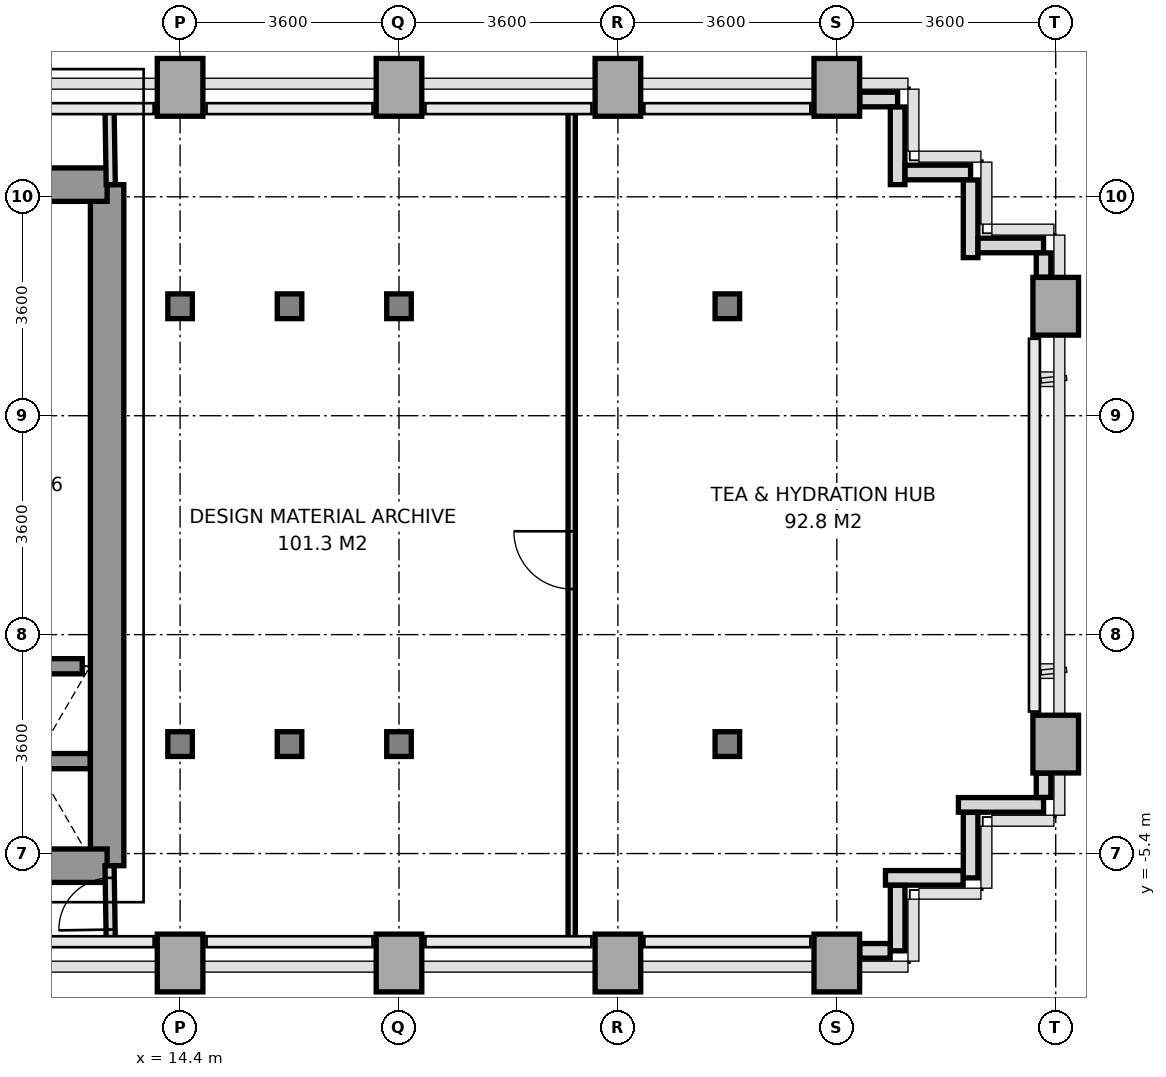
"""IFC4 building model, lengths in metres.
Left out: names, types, materials, properties, quantities, classifications, styles, units other than length and angle.
Written with IfcOpenShell. Run it as: python <this file> out.ifc"""

import sys

from ifc_helpers import new_model, si_unit, direction, frame, frame_2d, origin, origin_2d, place, context, subcontext, project, spatial, rectangle, i_section, extrude, source, transform, mapped, element, fill, save


model = new_model("IFC4")
c1 = context("Model", 3, precision=1e-05, world=origin(), true_north=direction((0.0, 1.0)))
c2 = subcontext(c1, "Body", "Model", "MODEL_VIEW")
j1 = project(units=[si_unit("LENGTHUNIT", "METRE"), si_unit("PLANEANGLEUNIT", "RADIAN")], contexts=[c1])
p1 = place(None, origin())
s1 = spatial("IfcSite", under=j1, at=p1, CompositionType="ELEMENT")
p2 = place(p1, origin())
s2 = spatial("IfcBuilding", under=s1, at=p2, CompositionType="ELEMENT")
p3 = place(p2, frame((0.0, 0.0, 57.8)))
s3 = spatial("IfcBuildingStorey", under=s2, at=p3, CompositionType="ELEMENT", Elevation=57.8)
m1 = source(origin(), c2, "Body", "SweptSolid", [
    extrude(rectangle(XDim=0.75, YDim=0.95, at=origin_2d()), origin(), (0.0, 0.0, 1.0), 3.2),
])
p4 = place(p3, frame((14.4, -7.2, 0.0), z_axis=(0.0, 0.0, 1.0), x_axis=(1.0, 0.0, 0.0)))
e1 = element("IfcColumn", 1, at=p4, inside=s3, PredefinedType="COLUMN", context=c2, shape_type="MappedRepresentation", body=[
    mapped(m1, transform((0.0, 0.0, 0.0), x_axis=(1.0, 0.0, 0.0), y_axis=(0.0, 1.0, 0.0), z_axis=(0.0, 0.0, 1.0), scale=1.0)),
])
m2 = source(origin(), c2, "Body", "SweptSolid", [
    extrude(i_section(OverallWidth=0.404, OverallDepth=0.407, WebThickness=0.022, FlangeThickness=0.035, at=origin_2d()), origin(), (0.0, 0.0, 1.0), 3.2),
])
for number, where, z_axis, x_axis in (
    (2, (14.4, -3.6, 0.0), (0.0, 0.0, 1.0), (1.0, 0.0, 0.0)),
    (3, (14.4, 3.6, 0.0), (0.0, 0.0, 1.0), (1.0, 0.0, 0.0)),
):
    element("IfcColumn", number, at=place(p3, frame(where, z_axis=z_axis, x_axis=x_axis)), inside=s3, PredefinedType="COLUMN", context=c2, shape_type="MappedRepresentation", body=[
        mapped(m2, transform((0.0, 0.0, 0.0), x_axis=(1.0, 0.0, 0.0), y_axis=(0.0, 1.0, 0.0), z_axis=(0.0, 0.0, 1.0), scale=1.0)),
    ])
p5 = place(p3, frame((14.4, 7.2, 0.0), z_axis=(0.0, 0.0, 1.0), x_axis=(1.0, 0.0, 0.0)))
e4 = element("IfcColumn", 4, at=p5, inside=s3, PredefinedType="COLUMN", context=c2, shape_type="MappedRepresentation", body=[
    mapped(m1, transform((0.0, 0.0, 0.0), x_axis=(1.0, 0.0, 0.0), y_axis=(0.0, 1.0, 0.0), z_axis=(0.0, 0.0, 1.0), scale=1.0)),
])
for number, where, z_axis, x_axis in (
    (5, (16.2, -3.6, 0.0), (0.0, 0.0, 1.0), (1.0, 0.0, 0.0)),
    (6, (16.2, 3.6, 0.0), (0.0, 0.0, 1.0), (1.0, 0.0, 0.0)),
):
    element("IfcColumn", number, at=place(p3, frame(where, z_axis=z_axis, x_axis=x_axis)), inside=s3, PredefinedType="COLUMN", context=c2, shape_type="MappedRepresentation", body=[
        mapped(m2, transform((0.0, 0.0, 0.0), x_axis=(1.0, 0.0, 0.0), y_axis=(0.0, 1.0, 0.0), z_axis=(0.0, 0.0, 1.0), scale=1.0)),
    ])
p6 = place(p3, frame((18.0, -7.2, 0.0), z_axis=(0.0, 0.0, 1.0), x_axis=(1.0, 0.0, 0.0)))
e7 = element("IfcColumn", 7, at=p6, inside=s3, PredefinedType="COLUMN", context=c2, shape_type="MappedRepresentation", body=[
    mapped(m1, transform((0.0, 0.0, 0.0), x_axis=(1.0, 0.0, 0.0), y_axis=(0.0, 1.0, 0.0), z_axis=(0.0, 0.0, 1.0), scale=1.0)),
])
for number, where, z_axis, x_axis in (
    (8, (18.0, -3.6, 0.0), (0.0, 0.0, 1.0), (1.0, 0.0, 0.0)),
    (9, (18.0, 3.6, 0.0), (0.0, 0.0, 1.0), (1.0, 0.0, 0.0)),
):
    element("IfcColumn", number, at=place(p3, frame(where, z_axis=z_axis, x_axis=x_axis)), inside=s3, PredefinedType="COLUMN", context=c2, shape_type="MappedRepresentation", body=[
        mapped(m2, transform((0.0, 0.0, 0.0), x_axis=(1.0, 0.0, 0.0), y_axis=(0.0, 1.0, 0.0), z_axis=(0.0, 0.0, 1.0), scale=1.0)),
    ])
for number, where, z_axis, x_axis in (
    (10, (18.0, 7.2, 0.0), (0.0, 0.0, 1.0), (1.0, 0.0, 0.0)),
    (11, (21.6, -7.2, 0.0), (0.0, 0.0, 1.0), (1.0, 0.0, 0.0)),
    (12, (21.6, 7.2, 0.0), (0.0, 0.0, 1.0), (1.0, 0.0, 0.0)),
):
    element("IfcColumn", number, at=place(p3, frame(where, z_axis=z_axis, x_axis=x_axis)), inside=s3, PredefinedType="COLUMN", context=c2, shape_type="MappedRepresentation", body=[
        mapped(m1, transform((0.0, 0.0, 0.0), x_axis=(1.0, 0.0, 0.0), y_axis=(0.0, 1.0, 0.0), z_axis=(0.0, 0.0, 1.0), scale=1.0)),
    ])
for number, where, z_axis, x_axis in (
    (13, (23.4, -3.6, 0.0), (0.0, 0.0, 1.0), (1.0, 0.0, 0.0)),
    (14, (23.4, 3.6, 0.0), (0.0, 0.0, 1.0), (1.0, 0.0, 0.0)),
):
    element("IfcColumn", number, at=place(p3, frame(where, z_axis=z_axis, x_axis=x_axis)), inside=s3, PredefinedType="COLUMN", context=c2, shape_type="MappedRepresentation", body=[
        mapped(m2, transform((0.0, 0.0, 0.0), x_axis=(1.0, 0.0, 0.0), y_axis=(0.0, 1.0, 0.0), z_axis=(0.0, 0.0, 1.0), scale=1.0)),
    ])
for number, where, z_axis, x_axis in (
    (15, (25.2, -7.2, 0.0), (0.0, 0.0, 1.0), (1.0, 0.0, 0.0)),
    (16, (25.2, 7.2, 0.0), (0.0, 0.0, 1.0), (1.0, 0.0, 0.0)),
    (17, (28.8, -3.6, 0.0), (0.0, 0.0, 1.0), (1.0, 0.0, 0.0)),
    (18, (28.8, 3.6, 0.0), (0.0, 0.0, 1.0), (1.0, 0.0, 0.0)),
):
    element("IfcColumn", number, at=place(p3, frame(where, z_axis=z_axis, x_axis=x_axis)), inside=s3, PredefinedType="COLUMN", context=c2, shape_type="MappedRepresentation", body=[
        mapped(m1, transform((0.0, 0.0, 0.0), x_axis=(1.0, 0.0, 0.0), y_axis=(0.0, 1.0, 0.0), z_axis=(0.0, 0.0, 1.0), scale=1.0)),
    ])
p7 = place(p3, frame((28.6, -4.6, 0.0), z_axis=(0.0, 0.0, 1.0), x_axis=(-1.0, 0.0, 0.0)))
e19 = element("IfcWall", 19, at=p7, inside=s3, PredefinedType="PARAPET", context=c2, shape_type="SweptSolid", body=[
    extrude(rectangle(XDim=1.4, YDim=0.24, at=frame_2d((0.7, 0.0))), origin(), (0.0, 0.0, 1.0), 1.15),
])
p8 = place(p3, frame((27.4, -4.723, 0.0), z_axis=(0.0, 0.0, 1.0), x_axis=(0.0, -1.0, 0.0)))
e20 = element("IfcWall", 20, at=p8, inside=s3, PredefinedType="PARAPET", context=c2, shape_type="SweptSolid", body=[
    extrude(rectangle(XDim=1.077, YDim=0.24, at=frame_2d((0.539, 0.0))), origin(), (0.0, 0.0, 1.0), 1.15),
])
p9 = place(p3, frame((27.277, -5.8, 0.0), z_axis=(0.0, 0.0, 1.0), x_axis=(-1.0, 0.0, 0.0)))
e21 = element("IfcWall", 21, at=p9, inside=s3, PredefinedType="PARAPET", context=c2, shape_type="SweptSolid", body=[
    extrude(rectangle(XDim=1.277, YDim=0.24, at=frame_2d((0.639, 0.0))), origin(), (0.0, 0.0, 1.0), 1.15),
])
p10 = place(p3, frame((26.2, -5.923, 0.0), z_axis=(0.0, 0.0, 1.0), x_axis=(0.0, -1.0, 0.0)))
e22 = element("IfcWall", 22, at=p10, inside=s3, PredefinedType="PARAPET", context=c2, shape_type="SweptSolid", body=[
    extrude(rectangle(XDim=1.077, YDim=0.24, at=frame_2d((0.539, 0.0))), origin(), (0.0, 0.0, 1.0), 1.15),
])
p11 = place(p3, frame((26.077, -7.0, 0.0), z_axis=(0.0, 0.0, 1.0), x_axis=(-1.0, 0.0, 0.0)))
e23 = element("IfcWall", 23, at=p11, inside=s3, PredefinedType="PARAPET", context=c2, shape_type="SweptSolid", body=[
    extrude(rectangle(XDim=0.499, YDim=0.24, at=frame_2d((0.25, 0.0))), origin(), (0.0, 0.0, 1.0), 1.15),
])
p12 = place(p3, frame((25.578, 7.0, 0.0), z_axis=(0.0, 0.0, 1.0), x_axis=(1.0, 0.0, 0.0)))
e24 = element("IfcWall", 24, at=p12, inside=s3, PredefinedType="PARAPET", context=c2, shape_type="SweptSolid", body=[
    extrude(rectangle(XDim=0.622, YDim=0.24, at=frame_2d((0.311, 0.0))), origin(), (0.0, 0.0, 1.0), 1.15),
])
p13 = place(p3, frame((26.2, 6.877, 0.0), z_axis=(0.0, 0.0, 1.0), x_axis=(0.0, -1.0, 0.0)))
e25 = element("IfcWall", 25, at=p13, inside=s3, PredefinedType="PARAPET", context=c2, shape_type="SweptSolid", body=[
    extrude(rectangle(XDim=1.277, YDim=0.24, at=frame_2d((0.638, 0.0))), origin(), (0.0, 0.0, 1.0), 1.15),
])
p14 = place(p3, frame((26.323, 5.8, 0.0), z_axis=(0.0, 0.0, 1.0), x_axis=(1.0, 0.0, 0.0)))
e26 = element("IfcWall", 26, at=p14, inside=s3, PredefinedType="PARAPET", context=c2, shape_type="SweptSolid", body=[
    extrude(rectangle(XDim=1.077, YDim=0.24, at=frame_2d((0.539, 0.0))), origin(), (0.0, 0.0, 1.0), 1.15),
])
p15 = place(p3, frame((27.4, 5.677, 0.0), z_axis=(0.0, 0.0, 1.0), x_axis=(0.0, -1.0, 0.0)))
e27 = element("IfcWall", 27, at=p15, inside=s3, PredefinedType="PARAPET", context=c2, shape_type="SweptSolid", body=[
    extrude(rectangle(XDim=1.277, YDim=0.24, at=frame_2d((0.639, 0.0))), origin(), (0.0, 0.0, 1.0), 1.15),
])
p16 = place(p3, frame((27.523, 4.6, 0.0), z_axis=(0.0, 0.0, 1.0), x_axis=(1.0, 0.0, 0.0)))
e28 = element("IfcWall", 28, at=p16, inside=s3, PredefinedType="PARAPET", context=c2, shape_type="SweptSolid", body=[
    extrude(rectangle(XDim=1.077, YDim=0.24, at=frame_2d((0.539, 0.0))), origin(), (0.0, 0.0, 1.0), 1.15),
])
for number, where, z_axis, x_axis in (
    (29, (28.6, 4.477, 0.0), (0.0, 0.0, 1.0), (0.0, -1.0, 0.0)),
    (30, (28.6, -4.078, 0.0), (0.0, 0.0, 1.0), (0.0, -1.0, 0.0)),
):
    element("IfcWall", number, at=place(p3, frame(where, z_axis=z_axis, x_axis=x_axis)), inside=s3, PredefinedType="PARAPET", context=c2, shape_type="SweptSolid", body=[
        extrude(rectangle(XDim=0.399, YDim=0.24, at=frame_2d((0.2, 0.0))), origin(), (0.0, 0.0, 1.0), 1.15),
    ])
p17 = place(p3, frame((13.2, -5.6, 0.0), z_axis=(0.0, 0.0, 1.0), x_axis=(0.0, 1.0, 0.0)))
e31 = element("IfcWall", 31, at=p17, inside=s3, PredefinedType="SHEAR", context=c2, shape_type="SweptSolid", body=[
    extrude(rectangle(XDim=11.2, YDim=0.55, at=frame_2d((5.6, 0.0))), origin(), (0.0, 0.0, 1.0), 3.2),
])
p18 = place(p3, frame((11.381, 5.6, 0.0), z_axis=(0.0, 0.0, 1.0), x_axis=(1.0, 0.0, 0.0)))
e32 = element("IfcWall", 32, at=p18, inside=s3, PredefinedType="SHEAR", context=c2, shape_type="SweptSolid", body=[
    extrude(rectangle(XDim=1.819, YDim=0.55, at=frame_2d((0.909, 0.0))), origin(), (0.0, 0.0, 1.0), 3.2),
])
p19 = place(p3, frame((5.4, -5.6, 0.0), z_axis=(0.0, 0.0, 1.0), x_axis=(1.0, 0.0, 0.0)))
e33 = element("IfcWall", 33, at=p19, inside=s3, PredefinedType="SHEAR", context=c2, shape_type="SweptSolid", body=[
    extrude(rectangle(XDim=7.8, YDim=0.55, at=frame_2d((3.9, 0.0))), origin(), (0.0, 0.0, 1.0), 3.2),
])
p20 = place(p19, frame((3.0, 0.0, 0.0)))
e34 = element("IfcOpeningElement", 34, at=p20, cuts=e33, PredefinedType="OPENING", context=c2, shape_type="SweptSolid", body=[
    extrude(rectangle(XDim=1.2, YDim=2.2, at=frame_2d((0.6, 1.1))), frame((0.0, 0.285, 0.0), z_axis=(0.0, -1.0, 0.0), x_axis=(1.0, 0.0, 0.0)), (0.0, 0.0, 1.0), 0.57),
])
p21 = place(p3, frame((11.08, -3.88, 0.0), z_axis=(0.0, 0.0, 1.0), x_axis=(1.0, 0.0, 0.0)))
e35 = element("IfcWall", 35, at=p21, inside=s3, PredefinedType="SOLIDWALL", context=c2, shape_type="SweptSolid", body=[
    extrude(rectangle(XDim=1.84, YDim=0.25, at=frame_2d((0.92, 0.0))), origin(), (0.0, 0.0, 1.0), 3.2),
])
p22 = place(p3, frame((11.209, -2.32, 0.0), z_axis=(0.0, 0.0, 1.0), x_axis=(1.0, 0.0, 0.0)))
e36 = element("IfcWall", 36, at=p22, inside=s3, PredefinedType="SOLIDWALL", context=c2, shape_type="SweptSolid", body=[
    extrude(rectangle(XDim=1.582, YDim=0.25, at=frame_2d((0.791, 0.0))), origin(), (0.0, 0.0, 1.0), 3.2),
])
p23 = place(p3, frame((13.26, 5.6, 0.0), z_axis=(0.0, 0.0, 1.0), x_axis=(-0.016013571389, 0.999871774545, 0.0)))
e37 = element("IfcWall", 37, at=p23, inside=s3, PredefinedType="PARTITIONING", context=c2, shape_type="SweptSolid", body=[
    extrude(rectangle(XDim=1.25, YDim=0.15, at=frame_2d((0.625, 0.0))), origin(), (0.0, 0.0, 1.0), 3.2),
])
p24 = place(p3, frame((13.26, -6.85, 0.0), z_axis=(0.0, 0.0, 1.0), x_axis=(-0.016013571389, 0.999871774545, 0.0)))
e38 = element("IfcWall", 38, at=p24, inside=s3, PredefinedType="PARTITIONING", context=c2, shape_type="SweptSolid", body=[
    extrude(rectangle(XDim=1.25, YDim=0.15, at=frame_2d((0.625, 0.0))), origin(), (0.0, 0.0, 1.0), 3.2),
])
p25 = place(p24, frame((0.2, 0.0, 0.0)))
e39 = element("IfcOpeningElement", 39, at=p25, cuts=e38, PredefinedType="OPENING", context=c2, shape_type="SweptSolid", body=[
    extrude(rectangle(XDim=0.85, YDim=2.1, at=frame_2d((0.425, 1.05))), frame((0.0, 0.085, 0.0), z_axis=(0.0, -1.0, 0.0), x_axis=(1.0, 0.0, 0.0)), (0.0, 0.0, 1.0), 0.17),
])
p26 = place(p3, frame((20.84, -6.85, 0.0), z_axis=(0.0, 0.0, 1.0), x_axis=(0.0, 1.0, 0.0)))
e40 = element("IfcWall", 40, at=p26, inside=s3, PredefinedType="PARTITIONING", context=c2, shape_type="SweptSolid", body=[
    extrude(rectangle(XDim=13.7, YDim=0.12, at=frame_2d((6.85, 0.0))), origin(), (0.0, 0.0, 1.0), 2.65),
])
p27 = place(p26, frame((5.8, 0.0, 0.0)))
e41 = element("IfcOpeningElement", 41, at=p27, cuts=e40, PredefinedType="OPENING", context=c2, shape_type="SweptSolid", body=[
    extrude(rectangle(XDim=0.95, YDim=2.15, at=frame_2d((0.475, 1.075))), frame((0.0, 0.07, 0.0), z_axis=(0.0, -1.0, 0.0), x_axis=(1.0, 0.0, 0.0)), (0.0, 0.0, 1.0), 0.14),
])
m3 = source(origin(), c2, "Body", "SweptSolid", [
    extrude(rectangle(XDim=0.85, YDim=2.1, at=frame_2d((0.425, 1.05))), frame((0.0, 0.025, 0.0), z_axis=(0.0, -1.0, 0.0), x_axis=(1.0, 0.0, 0.0)), (0.0, 0.0, 1.0), 0.05),
])
p28 = place(p25, origin())
e42 = element("IfcDoor", 42, at=p28, inside=s3, OperationType="SINGLE_SWING_LEFT", PredefinedType="DOOR", context=c2, shape_type="MappedRepresentation", body=[
    mapped(m3, transform((0.0, 0.0, 0.0), x_axis=(1.0, 0.0, 0.0), y_axis=(0.0, 1.0, 0.0), z_axis=(0.0, 0.0, 1.0), scale=1.0)),
])
fill(e39, e42)
m4 = source(origin(), c2, "Body", "SweptSolid", [
    extrude(rectangle(XDim=0.95, YDim=2.15, at=frame_2d((0.475, 1.075))), frame((0.0, 0.025, 0.0), z_axis=(0.0, -1.0, 0.0), x_axis=(1.0, 0.0, 0.0)), (0.0, 0.0, 1.0), 0.05),
])
p29 = place(p27, origin())
e43 = element("IfcDoor", 43, at=p29, inside=s3, OperationType="SINGLE_SWING_RIGHT", PredefinedType="DOOR", context=c2, shape_type="MappedRepresentation", body=[
    mapped(m4, transform((0.0, 0.0, 0.0), x_axis=(1.0, 0.0, 0.0), y_axis=(0.0, 1.0, 0.0), z_axis=(0.0, 0.0, 1.0), scale=1.0)),
])
fill(e41, e43)
save(model, sys.argv[1])
